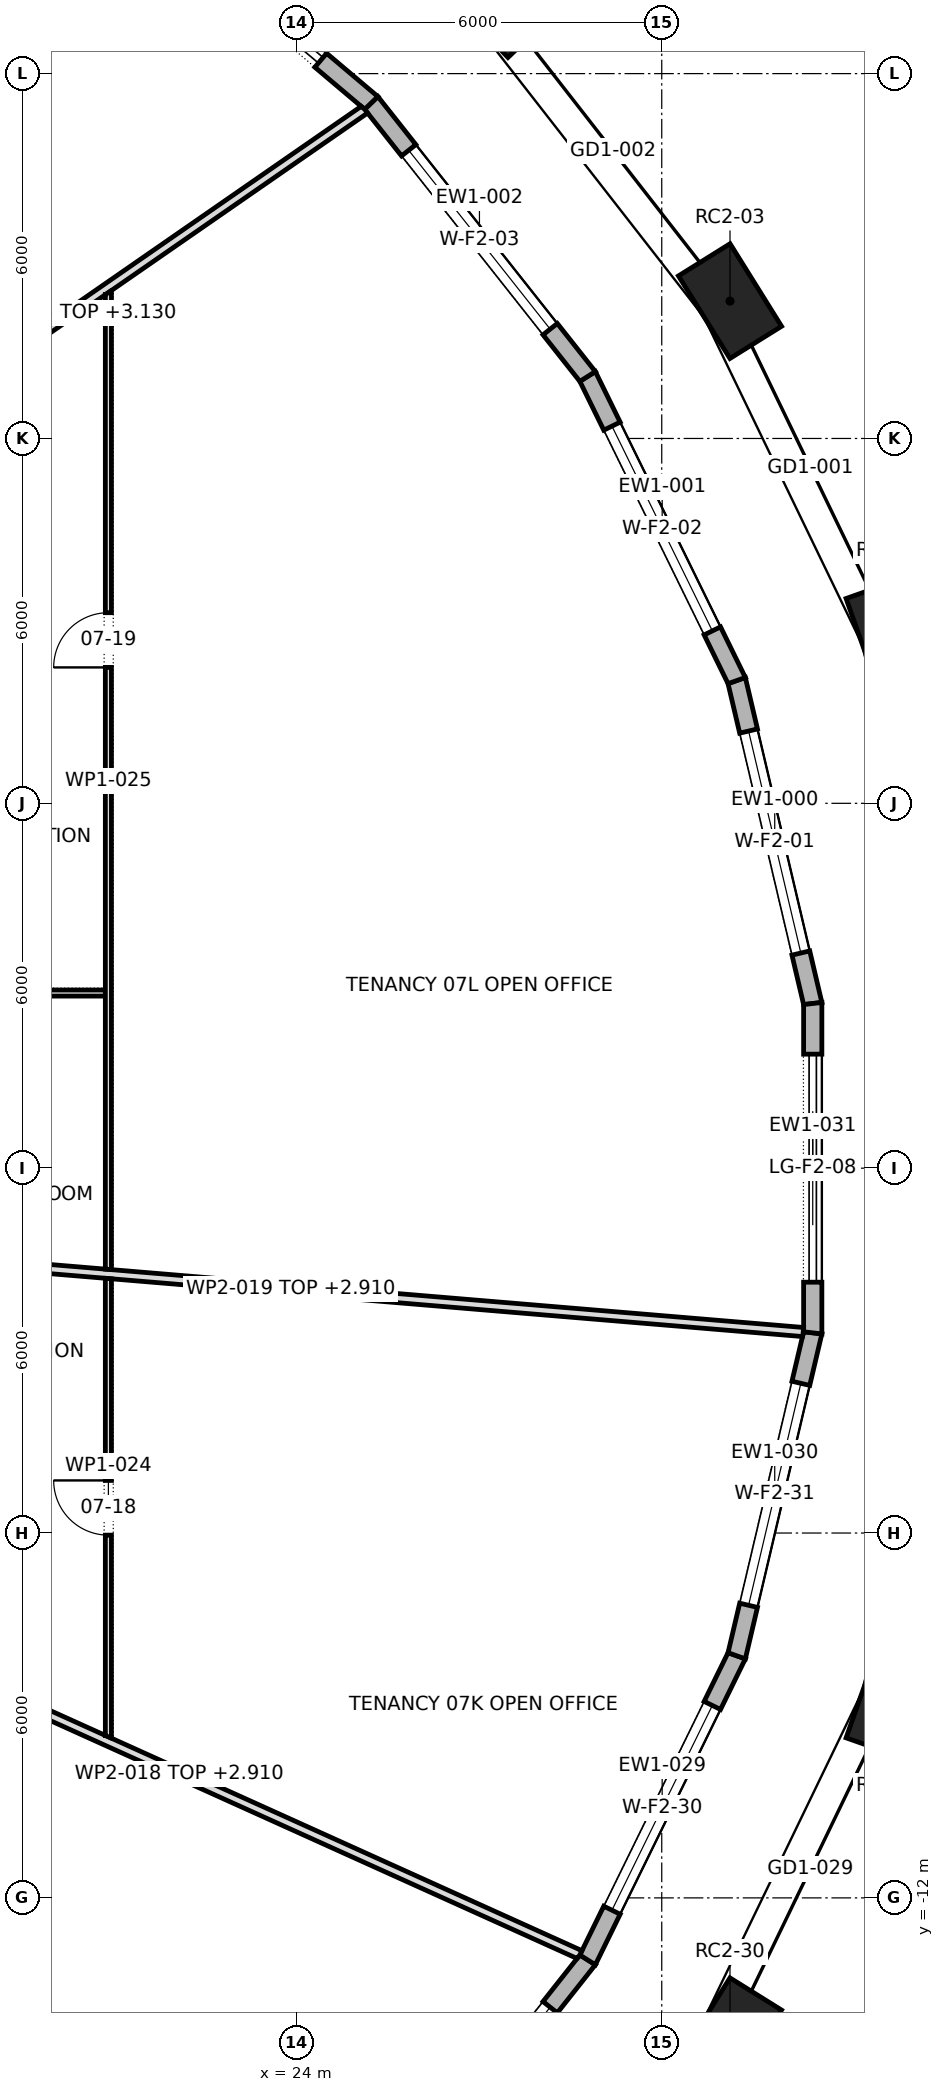
"""IFC4 building model, lengths in metres.
Left out: names, types, materials, properties, quantities, classifications, styles, units other than length and angle.
Written with IfcOpenShell. Run it as: python <this file> out.ifc"""

import sys

from ifc_helpers import new_model, si_unit, direction, frame, frame_2d, origin, origin_2d, place, context, subcontext, project, spatial, polyline, rectangle, outline, extrude, element, fill, save


model = new_model("IFC4")
c1 = context("Model", 3, precision=1e-05, world=origin(), true_north=direction((0.0, 1.0)))
c2 = subcontext(c1, "Body", "Model", "MODEL_VIEW")
j1 = project(units=[si_unit("LENGTHUNIT", "METRE"), si_unit("PLANEANGLEUNIT", "RADIAN")], contexts=[c1])
p1 = place(None, origin())
s1 = spatial("IfcSite", under=j1, at=p1, CompositionType="ELEMENT")
p2 = place(p1, origin())
s2 = spatial("IfcBuilding", under=s1, at=p2, CompositionType="ELEMENT")
p3 = place(p2, frame((0.0, 0.0, 104.5)))
s3 = spatial("IfcBuildingStorey", under=s2, at=p3, CompositionType="ELEMENT", Elevation=104.5)
for number, where, z_axis, x_axis in (
    (1, (33.77, 8.781, 0.0), (0.0, 0.0, 1.0), (-0.334, 0.943, 0.0)),
    (2, (31.123, 14.259, 0.0), (0.0, 0.0, 1.0), (-0.529, 0.849, 0.0)),
    (3, (27.279, 19.189, 0.0), (0.0, 0.0, 1.0), (-0.692, 0.722, 0.0)),
    (4, (31.123, -14.259, 0.0), (0.0, 0.0, 1.0), (0.529, 0.849, 0.0)),
    (5, (33.77, -8.781, 0.0), (0.0, 0.0, 1.0), (0.334, 0.943, 0.0)),
):
    element("IfcColumn", number, at=place(p3, frame(where, z_axis=z_axis, x_axis=x_axis)), inside=s3, PredefinedType="COLUMN", context=c2, shape_type="SweptSolid", body=[
        extrude(rectangle(XDim=1.6, YDim=1.0, at=origin_2d()), origin(), (0.0, 0.0, 1.0), 4.2),
    ])
p4 = place(p3, frame((32.483, 2.708, 0.0), z_axis=(0.0, 0.0, 1.0), x_axis=(-0.229193964616, 0.973380771632, 0.0)))
e6 = element("IfcWall", 6, at=p4, inside=s3, PredefinedType="STANDARD", context=c2, shape_type="SweptSolid", body=[
    extrude(outline(polyline([(-0.017, -0.15), (5.473, -0.15), (5.439, 0.15), (0.017, 0.15), (-0.017, -0.15)])), origin(), (0.0, 0.0, 1.0), 3.9),
])
p5 = place(p4, frame((0.853, 0.0, 0.6)))
e7 = element("IfcOpeningElement", 7, at=p5, cuts=e6, PredefinedType="OPENING", context=c2, shape_type="SweptSolid", body=[
    extrude(rectangle(XDim=3.75, YDim=2.85, at=frame_2d((1.875, 1.425))), frame((0.0, 0.162, 0.0), z_axis=(0.0, -1.0, 0.0), x_axis=(1.0, 0.0, 0.0)), (0.0, 0.0, 1.0), 0.324),
])
p6 = place(p3, frame((31.233, 8.019, 0.0), z_axis=(0.0, 0.0, 1.0), x_axis=(-0.440238988749, 0.897880633929, 0.0)))
e8 = element("IfcWall", 8, at=p6, inside=s3, PredefinedType="STANDARD", context=c2, shape_type="SweptSolid", body=[
    extrude(outline(polyline([(-0.017, -0.15), (5.586, -0.15), (5.553, 0.15), (0.017, 0.15), (-0.017, -0.15)])), origin(), (0.0, 0.0, 1.0), 3.9),
])
p7 = place(p6, frame((0.91, 0.0, 0.6)))
e9 = element("IfcOpeningElement", 9, at=p7, cuts=e8, PredefinedType="OPENING", context=c2, shape_type="SweptSolid", body=[
    extrude(rectangle(XDim=3.75, YDim=2.85, at=frame_2d((1.875, 1.425))), frame((0.0, 0.162, 0.0), z_axis=(0.0, -1.0, 0.0), x_axis=(1.0, 0.0, 0.0)), (0.0, 0.0, 1.0), 0.324),
])
p8 = place(p3, frame((28.781, 13.019, 0.0), z_axis=(0.0, 0.0, 1.0), x_axis=(-0.620329992039, 0.784340934146, 0.0)))
e10 = element("IfcWall", 10, at=p8, inside=s3, PredefinedType="STANDARD", context=c2, shape_type="SweptSolid", body=[
    extrude(outline(polyline([(-0.016, -0.15), (5.75, -0.15), (5.72, 0.15), (0.016, 0.15), (-0.016, -0.15)])), origin(), (0.0, 0.0, 1.0), 3.9),
])
p9 = place(p8, frame((0.993, 0.0, 0.6)))
e11 = element("IfcOpeningElement", 11, at=p9, cuts=e10, PredefinedType="OPENING", context=c2, shape_type="SweptSolid", body=[
    extrude(rectangle(XDim=3.75, YDim=2.85, at=frame_2d((1.875, 1.425))), frame((0.0, 0.162, 0.0), z_axis=(0.0, -1.0, 0.0), x_axis=(1.0, 0.0, 0.0)), (0.0, 0.0, 1.0), 0.324),
])
p10 = place(p3, frame((25.223, 17.518, 0.0), z_axis=(0.0, 0.0, 1.0), x_axis=(-0.763894031266, 0.645341699409, 0.0)))
e12 = element("IfcWall", 12, at=p10, inside=s3, PredefinedType="STANDARD", context=c2, shape_type="SweptSolid", body=[
    extrude(outline(polyline([(-0.015, -0.15), (5.939, -0.15), (5.911, 0.15), (0.015, 0.15), (-0.015, -0.15)])), origin(), (0.0, 0.0, 1.0), 3.9),
])
p11 = place(p10, frame((1.087, 0.0, 0.0)))
e13 = element("IfcOpeningElement", 13, at=p11, cuts=e12, PredefinedType="OPENING", context=c2, shape_type="SweptSolid", body=[
    extrude(rectangle(XDim=3.75, YDim=3.45, at=frame_2d((1.875, 1.725))), frame((0.0, 0.162, 0.0), z_axis=(0.0, -1.0, 0.0), x_axis=(1.0, 0.0, 0.0)), (0.0, 0.0, 1.0), 0.324),
])
p12 = place(p3, frame((25.223, -17.518, 0.0), z_axis=(0.0, 0.0, 1.0), x_axis=(0.620329992039, 0.784340934146, 0.0)))
e14 = element("IfcWall", 14, at=p12, inside=s3, PredefinedType="STANDARD", context=c2, shape_type="SweptSolid", body=[
    extrude(outline(polyline([(-0.015, -0.15), (5.751, -0.15), (5.719, 0.15), (0.015, 0.15), (-0.015, -0.15)])), origin(), (0.0, 0.0, 1.0), 3.9),
])
p13 = place(p12, frame((0.993, 0.0, 0.6)))
e15 = element("IfcOpeningElement", 15, at=p13, cuts=e14, PredefinedType="OPENING", context=c2, shape_type="SweptSolid", body=[
    extrude(rectangle(XDim=3.75, YDim=2.85, at=frame_2d((1.875, 1.425))), frame((0.0, 0.162, 0.0), z_axis=(0.0, -1.0, 0.0), x_axis=(1.0, 0.0, 0.0)), (0.0, 0.0, 1.0), 0.324),
])
p14 = place(p3, frame((28.781, -13.019, 0.0), z_axis=(0.0, 0.0, 1.0), x_axis=(0.440238988749, 0.897880633929, 0.0)))
e16 = element("IfcWall", 16, at=p14, inside=s3, PredefinedType="STANDARD", context=c2, shape_type="SweptSolid", body=[
    extrude(outline(polyline([(-0.016, -0.15), (5.586, -0.15), (5.553, 0.15), (0.016, 0.15), (-0.016, -0.15)])), origin(), (0.0, 0.0, 1.0), 3.9),
])
p15 = place(p14, frame((0.91, 0.0, 0.6)))
e17 = element("IfcOpeningElement", 17, at=p15, cuts=e16, PredefinedType="OPENING", context=c2, shape_type="SweptSolid", body=[
    extrude(rectangle(XDim=3.75, YDim=2.85, at=frame_2d((1.875, 1.425))), frame((0.0, 0.162, 0.0), z_axis=(0.0, -1.0, 0.0), x_axis=(1.0, 0.0, 0.0)), (0.0, 0.0, 1.0), 0.324),
])
p16 = place(p3, frame((31.233, -8.019, 0.0), z_axis=(0.0, 0.0, 1.0), x_axis=(0.229193964616, 0.973380771632, 0.0)))
e18 = element("IfcWall", 18, at=p16, inside=s3, PredefinedType="STANDARD", context=c2, shape_type="SweptSolid", body=[
    extrude(outline(polyline([(-0.017, -0.15), (5.473, -0.15), (5.439, 0.15), (0.017, 0.15), (-0.017, -0.15)])), origin(), (0.0, 0.0, 1.0), 3.9),
])
p17 = place(p16, frame((0.853, 0.0, 0.6)))
e19 = element("IfcOpeningElement", 19, at=p17, cuts=e18, PredefinedType="OPENING", context=c2, shape_type="SweptSolid", body=[
    extrude(rectangle(XDim=3.75, YDim=2.85, at=frame_2d((1.875, 1.425))), frame((0.0, 0.162, 0.0), z_axis=(0.0, -1.0, 0.0), x_axis=(1.0, 0.0, 0.0)), (0.0, 0.0, 1.0), 0.324),
])
p18 = place(p3, frame((32.483, -2.708, 0.0), z_axis=(0.0, 0.0, 1.0), x_axis=(0.0, 1.0, 0.0)))
e20 = element("IfcWall", 20, at=p18, inside=s3, PredefinedType="STANDARD", context=c2, shape_type="SweptSolid", body=[
    extrude(outline(polyline([(-0.017, -0.15), (5.433, -0.15), (5.398, 0.15), (0.017, 0.15), (-0.017, -0.15)])), origin(), (0.0, 0.0, 1.0), 3.9),
])
p19 = place(p18, frame((0.833, 0.0, 0.0)))
e21 = element("IfcOpeningElement", 21, at=p19, cuts=e20, PredefinedType="OPENING", context=c2, shape_type="SweptSolid", body=[
    extrude(rectangle(XDim=3.75, YDim=3.45, at=frame_2d((1.875, 1.725))), frame((0.0, 0.162, 0.0), z_axis=(0.0, -1.0, 0.0), x_axis=(1.0, 0.0, 0.0)), (0.0, 0.0, 1.0), 0.324),
])
p20 = place(p3, frame((15.444, -6.97, 0.0), z_axis=(0.0, 0.0, 1.0), x_axis=(0.911385678544, -0.411553331835, 0.0)))
e22 = element("IfcWall", 22, at=p20, inside=s3, PredefinedType="PARTITIONING", context=c2, shape_type="SweptSolid", body=[
    extrude(outline(polyline([(0.068, -0.075), (1.869, -0.075), (3.67, -0.075), (5.471, -0.075), (7.272, -0.075), (9.074, -0.075), (10.875, -0.075), (12.676, -0.075), (14.477, -0.075), (14.495, -0.004), (14.497, 0.058), (14.497, 0.075), (12.778, 0.075), (11.058, 0.075), (9.339, 0.075), (7.62, 0.075), (5.9, 0.075), (5.898, 0.074), (5.898, 0.075), (3.932, 0.075), (1.966, 0.075), (0.0, 0.075), (0.068, -0.075)])), origin(), (0.0, 0.0, 1.0), 2.91),
])
p21 = place(p3, frame((15.454, -1.284, 0.0), z_axis=(0.0, 0.0, 1.0), x_axis=(0.996525641357, -0.083286530234, 0.0)))
e23 = element("IfcWall", 23, at=p21, inside=s3, PredefinedType="PARTITIONING", context=c2, shape_type="SweptSolid", body=[
    extrude(outline(polyline([(0.028, -0.075), (1.905, -0.075), (3.783, -0.075), (5.66, -0.075), (7.538, -0.075), (9.416, -0.075), (11.293, -0.075), (13.171, -0.075), (15.048, -0.075), (16.926, -0.075), (16.931, -0.038), (16.931, 0.075), (15.05, 0.075), (13.169, 0.075), (11.288, 0.075), (9.406, 0.075), (7.525, 0.075), (5.644, 0.075), (3.762, 0.075), (1.881, 0.075), (0.0, 0.075), (0.0, 0.074), (0.006, 0.005), (0.021, 0.006), (0.028, -0.075)])), origin(), (0.0, 0.0, 1.0), 2.91),
])
p22 = place(p3, frame((15.46, 2.88, 0.0), z_axis=(0.0, 0.0, 1.0), x_axis=(1.0, 0.0, 0.0)))
e24 = element("IfcWall", 24, at=p22, inside=s3, PredefinedType="PARTITIONING", context=c2, shape_type="SweptSolid", body=[
    extrude(outline(polyline([(0.0, -0.05), (1.797, -0.05), (3.593, -0.05), (5.39, -0.05), (5.39, 0.05), (3.598, 0.05), (1.806, 0.05), (0.015, 0.05), (0.015, 0.0), (0.0, 0.0), (0.0, -0.05)])), origin(), (0.0, 0.0, 1.0), 3.9),
])
p23 = place(p3, frame((15.433, 10.702, 0.0), z_axis=(0.0, 0.0, 1.0), x_axis=(0.82202509952, 0.569451258458, 0.0)))
e25 = element("IfcWall", 25, at=p23, inside=s3, PredefinedType="PARTITIONING", context=c2, shape_type="SweptSolid", body=[
    extrude(outline(polyline([(0.0, -0.075), (1.635, -0.075), (3.269, -0.075), (4.904, -0.075), (6.538, -0.075), (6.54, -0.072), (6.544, -0.075), (8.291, -0.075), (10.038, -0.075), (11.785, -0.075), (11.785, -0.071), (11.78, 0.003), (11.761, 0.075), (9.818, 0.075), (7.875, 0.075), (5.932, 0.075), (3.989, 0.075), (2.046, 0.075), (0.104, 0.075), (0.0, -0.074), (0.0, -0.075)])), origin(), (0.0, 0.0, 1.0), 3.13),
])
p24 = place(p3, frame((20.9, -1.811, 0.0), z_axis=(0.0, 0.0, 1.0), x_axis=(0.0, -1.0, 0.0)))
e26 = element("IfcWall", 26, at=p24, inside=s3, PredefinedType="PARTITIONING", context=c2, shape_type="SweptSolid", body=[
    extrude(outline(polyline([(0.0, -0.05), (1.879, -0.05), (3.759, -0.05), (5.638, -0.05), (7.518, -0.05), (7.562, 0.049), (7.562, 0.05), (5.674, 0.05), (3.785, 0.05), (1.897, 0.05), (0.008, 0.05), (0.0, -0.047), (0.0, -0.05)])), origin(), (0.0, 0.0, 1.0), 3.9),
])
p25 = place(p24, frame((3.324, 0.0, 0.0)))
e27 = element("IfcOpeningElement", 27, at=p25, cuts=e26, PredefinedType="OPENING", context=c2, shape_type="SweptSolid", body=[
    extrude(rectangle(XDim=0.9, YDim=2.1, at=frame_2d((0.45, 1.05))), frame((0.0, 0.062, 0.0), z_axis=(0.0, -1.0, 0.0), x_axis=(1.0, 0.0, 0.0)), (0.0, 0.0, 1.0), 0.124),
])
p26 = place(p3, frame((20.9, -1.668, 0.0), z_axis=(0.0, 0.0, 1.0), x_axis=(0.0, 1.0, 0.0)))
e28 = element("IfcWall", 28, at=p26, inside=s3, PredefinedType="PARTITIONING", context=c2, shape_type="SweptSolid", body=[
    extrude(outline(polyline([(16.102, -0.05), (16.102, -0.05), (16.032, 0.05), (14.127, 0.05), (12.221, 0.05), (10.315, 0.05), (8.41, 0.05), (6.504, 0.05), (4.598, 0.05), (4.598, 0.05), (4.499, 0.05), (4.499, 0.05), (3.002, 0.05), (1.505, 0.05), (0.008, 0.05), (0.0, -0.049), (0.0, -0.05), (1.789, -0.05), (3.578, -0.05), (5.367, -0.05), (7.156, -0.05), (8.945, -0.05), (10.734, -0.05), (12.523, -0.05), (14.312, -0.05), (16.102, -0.05)])), origin(), (0.0, 0.0, 1.0), 3.9),
])
p27 = place(p26, frame((9.904, 0.0, 0.0)))
e29 = element("IfcOpeningElement", 29, at=p27, cuts=e28, PredefinedType="OPENING", context=c2, shape_type="SweptSolid", body=[
    extrude(rectangle(XDim=0.9, YDim=2.1, at=frame_2d((0.45, 1.05))), frame((0.0, 0.062, 0.0), z_axis=(0.0, -1.0, 0.0), x_axis=(1.0, 0.0, 0.0)), (0.0, 0.0, 1.0), 0.124),
])
p28 = place(p5, origin())
e30 = element("IfcWindow", 30, at=p28, inside=s3, PartitioningType="TRIPLE_PANEL_VERTICAL", PredefinedType="WINDOW", context=c2, shape_type="SweptSolid", body=[
    extrude(rectangle(XDim=3.75, YDim=2.85, at=frame_2d((1.875, 1.425))), frame((0.0, 0.03, 0.0), z_axis=(0.0, -1.0, 0.0), x_axis=(1.0, 0.0, 0.0)), (0.0, 0.0, 1.0), 0.06),
])
fill(e7, e30)
p29 = place(p7, origin())
e31 = element("IfcWindow", 31, at=p29, inside=s3, PartitioningType="TRIPLE_PANEL_VERTICAL", PredefinedType="WINDOW", context=c2, shape_type="SweptSolid", body=[
    extrude(rectangle(XDim=3.75, YDim=2.85, at=frame_2d((1.875, 1.425))), frame((0.0, 0.03, 0.0), z_axis=(0.0, -1.0, 0.0), x_axis=(1.0, 0.0, 0.0)), (0.0, 0.0, 1.0), 0.06),
])
fill(e9, e31)
p30 = place(p9, origin())
e32 = element("IfcWindow", 32, at=p30, inside=s3, PartitioningType="TRIPLE_PANEL_VERTICAL", PredefinedType="WINDOW", context=c2, shape_type="SweptSolid", body=[
    extrude(rectangle(XDim=3.75, YDim=2.85, at=frame_2d((1.875, 1.425))), frame((0.0, 0.03, 0.0), z_axis=(0.0, -1.0, 0.0), x_axis=(1.0, 0.0, 0.0)), (0.0, 0.0, 1.0), 0.06),
])
fill(e11, e32)
p31 = place(p11, origin())
e33 = element("IfcDoor", 33, at=p31, inside=s3, OperationType="DOUBLE_DOOR_SLIDING", PredefinedType="DOOR", context=c2, shape_type="SweptSolid", body=[
    extrude(rectangle(XDim=3.75, YDim=3.45, at=frame_2d((1.875, 1.725))), frame((0.0, 0.025, 0.0), z_axis=(0.0, -1.0, 0.0), x_axis=(1.0, 0.0, 0.0)), (0.0, 0.0, 1.0), 0.05),
])
fill(e13, e33)
p32 = place(p13, origin())
e34 = element("IfcWindow", 34, at=p32, inside=s3, PartitioningType="TRIPLE_PANEL_VERTICAL", PredefinedType="WINDOW", context=c2, shape_type="SweptSolid", body=[
    extrude(rectangle(XDim=3.75, YDim=2.85, at=frame_2d((1.875, 1.425))), frame((0.0, 0.03, 0.0), z_axis=(0.0, -1.0, 0.0), x_axis=(1.0, 0.0, 0.0)), (0.0, 0.0, 1.0), 0.06),
])
fill(e15, e34)
p33 = place(p15, origin())
e35 = element("IfcWindow", 35, at=p33, inside=s3, PartitioningType="TRIPLE_PANEL_VERTICAL", PredefinedType="WINDOW", context=c2, shape_type="SweptSolid", body=[
    extrude(rectangle(XDim=3.75, YDim=2.85, at=frame_2d((1.875, 1.425))), frame((0.0, 0.03, 0.0), z_axis=(0.0, -1.0, 0.0), x_axis=(1.0, 0.0, 0.0)), (0.0, 0.0, 1.0), 0.06),
])
fill(e17, e35)
p34 = place(p17, origin())
e36 = element("IfcWindow", 36, at=p34, inside=s3, PartitioningType="TRIPLE_PANEL_VERTICAL", PredefinedType="WINDOW", context=c2, shape_type="SweptSolid", body=[
    extrude(rectangle(XDim=3.75, YDim=2.85, at=frame_2d((1.875, 1.425))), frame((0.0, 0.03, 0.0), z_axis=(0.0, -1.0, 0.0), x_axis=(1.0, 0.0, 0.0)), (0.0, 0.0, 1.0), 0.06),
])
fill(e19, e36)
p35 = place(p19, origin())
e37 = element("IfcDoor", 37, at=p35, inside=s3, OperationType="DOUBLE_DOOR_SLIDING", PredefinedType="DOOR", context=c2, shape_type="SweptSolid", body=[
    extrude(rectangle(XDim=3.75, YDim=3.45, at=frame_2d((1.875, 1.725))), frame((0.0, 0.025, 0.0), z_axis=(0.0, -1.0, 0.0), x_axis=(1.0, 0.0, 0.0)), (0.0, 0.0, 1.0), 0.05),
])
fill(e21, e37)
p36 = place(p25, frame((0.9, 0.0, 0.0), z_axis=(0.0, 0.0, 1.0), x_axis=(-1.0, 0.0, 0.0)))
e38 = element("IfcDoor", 38, at=p36, inside=s3, OperationType="SINGLE_SWING_LEFT", PredefinedType="DOOR", context=c2, shape_type="SweptSolid", body=[
    extrude(rectangle(XDim=0.9, YDim=2.1, at=frame_2d((0.45, 1.05))), frame((0.0, 0.025, 0.0), z_axis=(0.0, -1.0, 0.0), x_axis=(1.0, 0.0, 0.0)), (0.0, 0.0, 1.0), 0.05),
])
fill(e27, e38)
p37 = place(p27, origin())
e39 = element("IfcDoor", 39, at=p37, inside=s3, OperationType="SINGLE_SWING_RIGHT", PredefinedType="DOOR", context=c2, shape_type="SweptSolid", body=[
    extrude(rectangle(XDim=0.9, YDim=2.1, at=frame_2d((0.45, 1.05))), frame((0.0, 0.025, 0.0), z_axis=(0.0, -1.0, 0.0), x_axis=(1.0, 0.0, 0.0)), (0.0, 0.0, 1.0), 0.05),
])
fill(e29, e39)
save(model, sys.argv[1])
